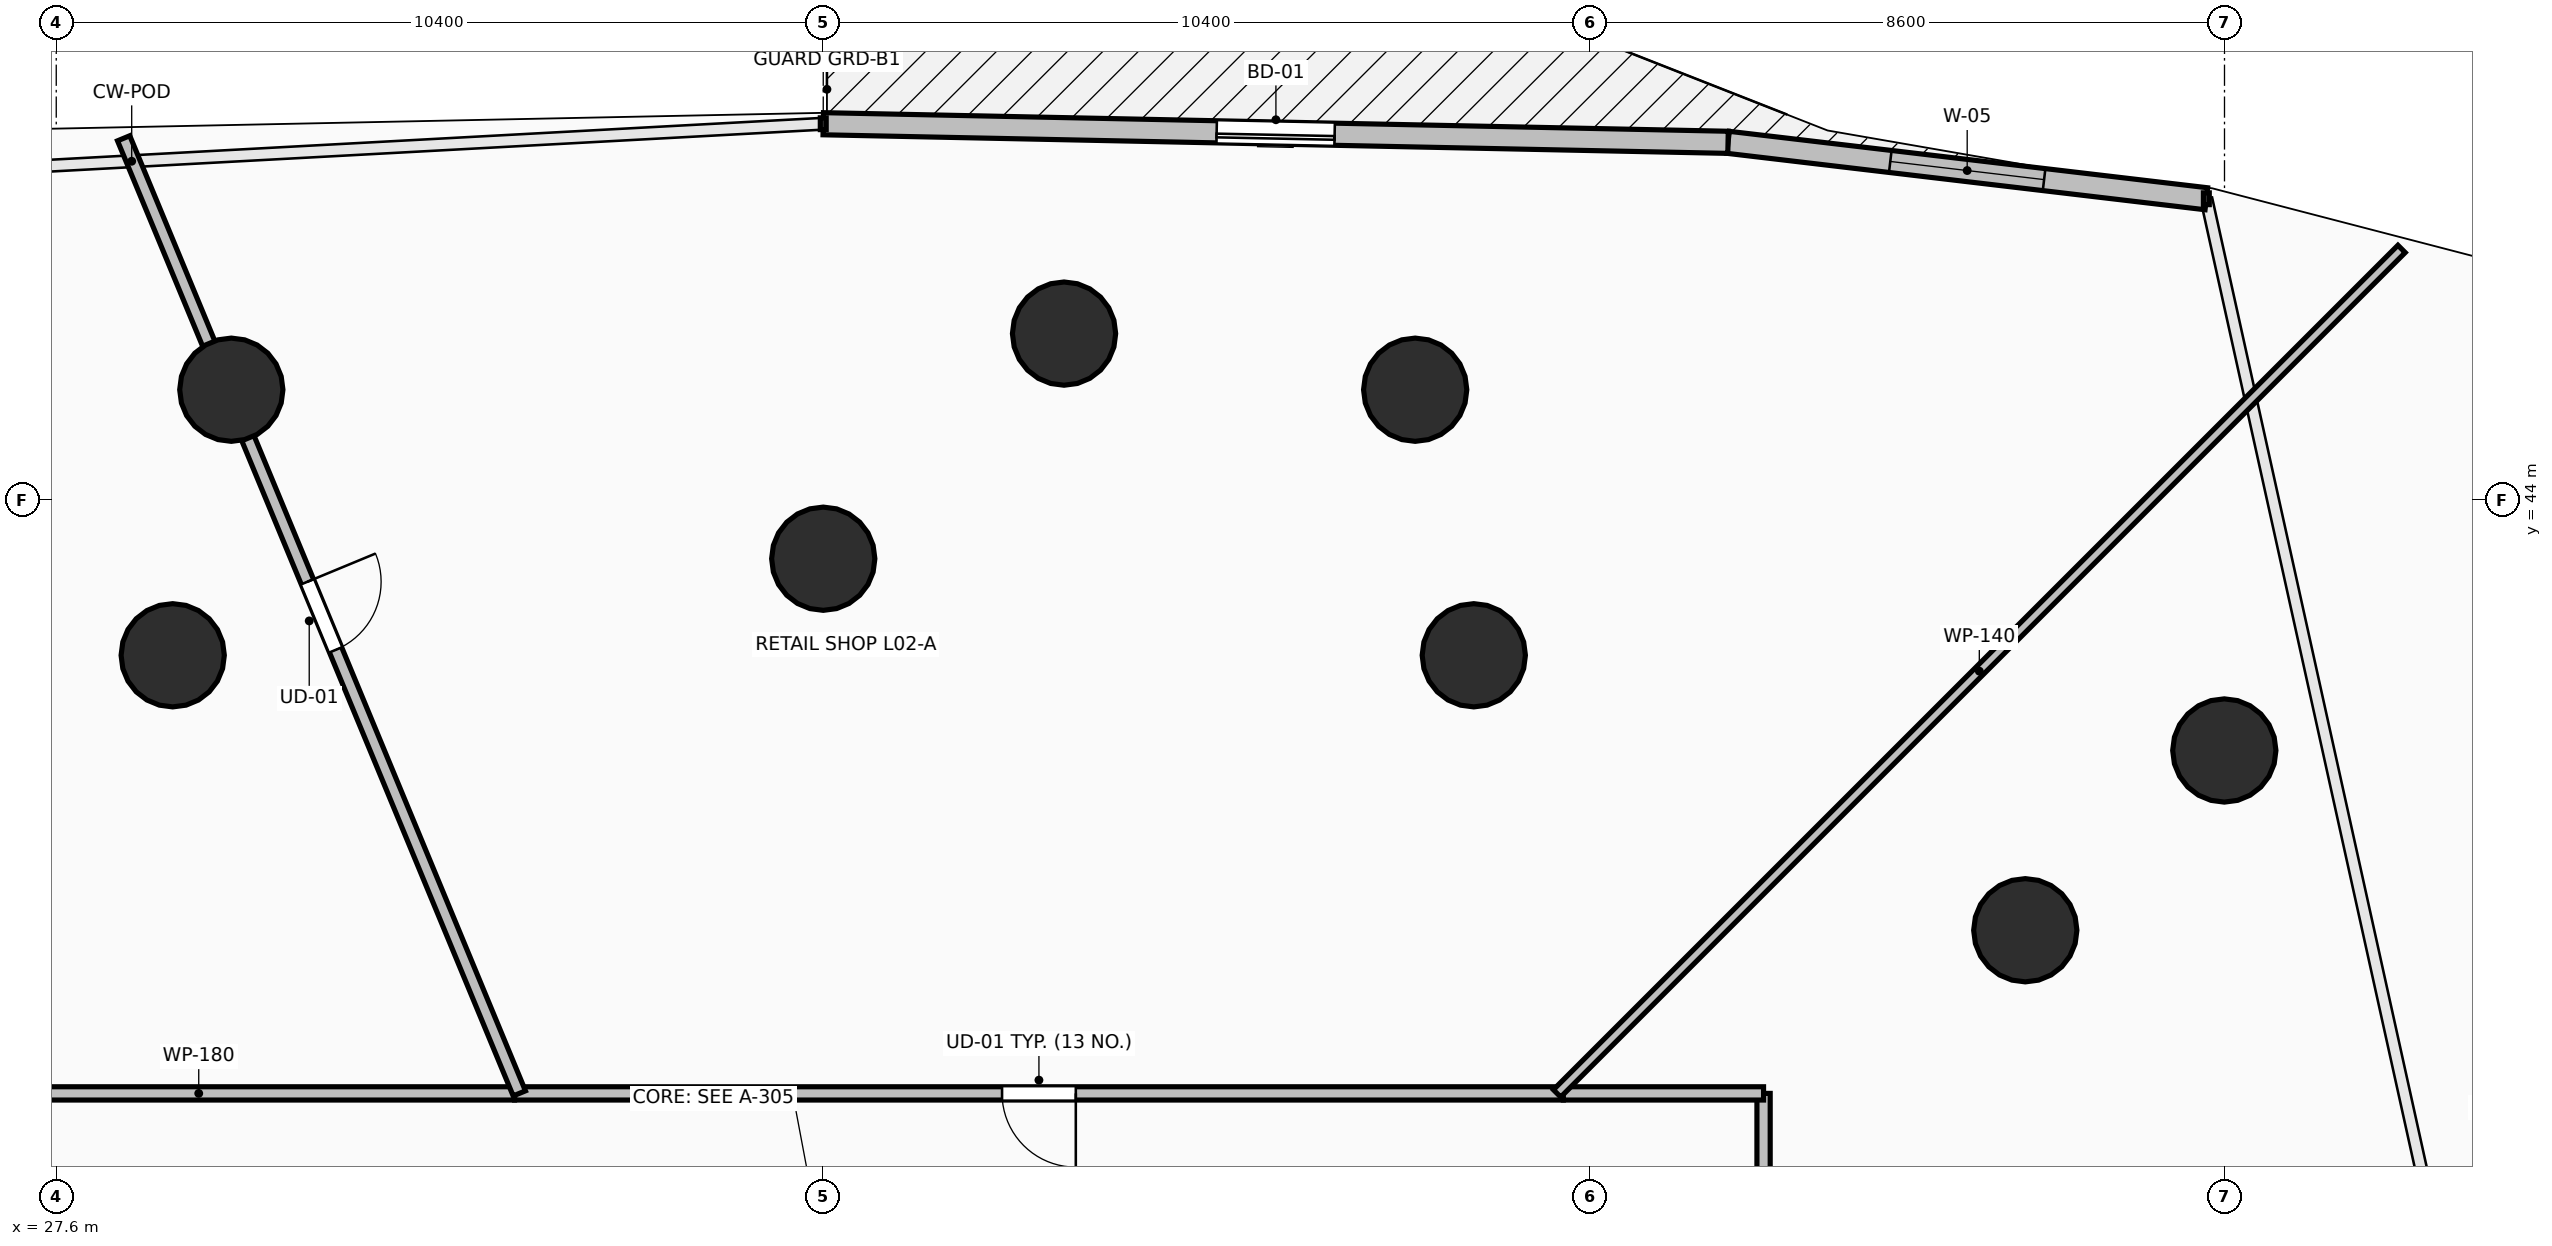
"""IFC4 building model, lengths in metres.
Left out: names, types, materials, properties, quantities, classifications, styles, units other than length and angle.
Written with IfcOpenShell. Run it as: python <this file> out.ifc"""

import sys

from ifc_helpers import new_model, si_unit, direction, frame, frame_2d, origin, origin_2d, place, context, subcontext, project, spatial, rectangle, circle, extrude, element, fill, save


model = new_model("IFC4")
c1 = context("Model", 3, precision=1e-05, world=origin(), true_north=direction((0.0, 1.0)))
c2 = subcontext(c1, "Body", "Model", "MODEL_VIEW")
j1 = project(units=[si_unit("LENGTHUNIT", "METRE"), si_unit("PLANEANGLEUNIT", "RADIAN")], contexts=[c1])
p1 = place(None, origin())
s1 = spatial("IfcSite", under=j1, at=p1, CompositionType="ELEMENT")
p2 = place(p1, origin())
s2 = spatial("IfcBuilding", under=s1, at=p2, CompositionType="ELEMENT")
p3 = place(p2, frame((0.0, 0.0, 9.6)))
s3 = spatial("IfcBuildingStorey", under=s2, at=p3, CompositionType="ELEMENT", Elevation=9.6)
for number, where, z_axis, x_axis in (
    (1, (54.299, 38.162, 0.0), (0.0, 0.0, 1.0), (0.707, 0.707, 0.0)),
    (2, (46.821, 41.891, 0.0), (0.0, 0.0, 1.0), (0.383, 0.924, 0.0)),
    (3, (38.0, 43.2, 0.0), (0.0, 0.0, 1.0), (0.0, 1.0, 0.0)),
    (4, (29.179, 41.891, 0.0), (0.0, 0.0, 1.0), (-0.383, 0.924, 0.0)),
    (5, (56.997, 40.6, 0.0), (0.0, 0.0, 1.0), (0.707, 0.707, 0.0)),
    (6, (46.026, 45.492, 0.0), (0.0, 0.0, 1.0), (0.383, 0.924, 0.0)),
    (7, (41.265, 46.252, 0.0), (0.0, 0.0, 1.0), (0.0, 1.0, 0.0)),
    (8, (29.974, 45.492, 0.0), (0.0, 0.0, 1.0), (-0.383, 0.924, 0.0)),
):
    element("IfcColumn", number, at=place(p3, frame(where, z_axis=z_axis, x_axis=x_axis)), inside=s3, PredefinedType="COLUMN", context=c2, shape_type="SweptSolid", body=[
        extrude(circle(Radius=0.7, at=origin_2d()), origin(), (0.0, 0.0, 1.0), 4.8),
    ])
p4 = place(p3, frame((56.754, 48.081, 0.0), z_axis=(0.0, 0.0, 1.0), x_axis=(-0.99311278541, 0.117162261226, 0.0)))
e9 = element("IfcWall", 9, at=p4, inside=s3, PredefinedType="STANDARD", context=c2, shape_type="SweptSolid", body=[
    extrude(rectangle(XDim=6.531, YDim=0.3, at=frame_2d((3.265, 0.0))), origin(), (0.0, 0.0, 1.0), 4.48),
])
p5 = place(p4, frame((2.215, 0.0, 0.85)))
e10 = element("IfcOpeningElement", 10, at=p5, cuts=e9, PredefinedType="OPENING", context=c2, shape_type="SweptSolid", body=[
    extrude(rectangle(XDim=2.1, YDim=2.8, at=frame_2d((1.05, 1.4))), frame((0.0, 0.165, 0.0), z_axis=(0.0, -1.0, 0.0), x_axis=(1.0, 0.0, 0.0)), (0.0, 0.0, 1.0), 0.33),
])
p6 = place(p3, frame((50.268, 48.846, 0.0), z_axis=(0.0, 0.0, 1.0), x_axis=(-0.99978877583, 0.020552462746, 0.0)))
e11 = element("IfcWall", 11, at=p6, inside=s3, PredefinedType="STANDARD", context=c2, shape_type="SweptSolid", body=[
    extrude(rectangle(XDim=12.271, YDim=0.3, at=frame_2d((6.135, 0.0))), origin(), (0.0, 0.0, 1.0), 4.48),
])
p7 = place(p6, frame((5.335, 0.0, 0.0)))
e12 = element("IfcOpeningElement", 12, at=p7, cuts=e11, PredefinedType="OPENING", context=c2, shape_type="SweptSolid", body=[
    extrude(rectangle(XDim=1.6, YDim=2.3, at=frame_2d((0.8, 1.15))), frame((0.0, 0.165, 0.0), z_axis=(0.0, -1.0, 0.0), x_axis=(1.0, 0.0, 0.0)), (0.0, 0.0, 1.0), 0.33),
])
p8 = place(p3, frame((48.035, 35.95, 0.0), z_axis=(0.0, 0.0, 1.0), x_axis=(-1.0, 0.0, 0.0)))
e13 = element("IfcWall", 13, at=p8, inside=s3, PredefinedType="PARTITIONING", context=c2, shape_type="SweptSolid", body=[
    extrude(rectangle(XDim=14.221, YDim=0.18, at=frame_2d((7.11, 0.0))), origin(), (0.0, 0.0, 1.0), 3.672),
])
p9 = place(p8, frame((6.611, 0.0, 0.0)))
e14 = element("IfcOpeningElement", 14, at=p9, cuts=e13, PredefinedType="OPENING", context=c2, shape_type="SweptSolid", body=[
    extrude(rectangle(XDim=1.0, YDim=2.15, at=frame_2d((0.5, 1.075))), frame((0.0, 0.105, 0.0), z_axis=(0.0, -1.0, 0.0), x_axis=(1.0, 0.0, 0.0)), (0.0, 0.0, 1.0), 0.21),
])
p10 = place(p3, frame((33.814, 35.95, 0.0), z_axis=(0.0, 0.0, 1.0), x_axis=(-1.0, 0.0, 0.0)))
e15 = element("IfcWall", 15, at=p10, inside=s3, PredefinedType="PARTITIONING", context=c2, shape_type="SweptSolid", body=[
    extrude(rectangle(XDim=8.564, YDim=0.18, at=frame_2d((4.282, 0.0))), origin(), (0.0, 0.0, 1.0), 3.672),
])
p11 = place(p3, frame((50.75, 26.2, 0.0), z_axis=(0.0, 0.0, 1.0), x_axis=(0.0, 1.0, 0.0)))
e16 = element("IfcWall", 16, at=p11, inside=s3, PredefinedType="PARTITIONING", context=c2, shape_type="SweptSolid", body=[
    extrude(rectangle(XDim=9.75, YDim=0.18, at=frame_2d((4.875, 0.0))), origin(), (0.0, 0.0, 1.0), 3.672),
])
p12 = place(p11, frame((4.375, 0.0, 0.0)))
e17 = element("IfcOpeningElement", 17, at=p12, cuts=e16, PredefinedType="OPENING", context=c2, shape_type="SweptSolid", body=[
    extrude(rectangle(XDim=1.0, YDim=2.15, at=frame_2d((0.5, 1.075))), frame((0.0, 0.105, 0.0), z_axis=(0.0, -1.0, 0.0), x_axis=(1.0, 0.0, 0.0)), (0.0, 0.0, 1.0), 0.21),
])
p13 = place(p3, frame((50.75, 35.95, 0.0), z_axis=(0.0, 0.0, 1.0), x_axis=(-1.0, 0.0, 0.0)))
e18 = element("IfcWall", 18, at=p13, inside=s3, PredefinedType="PARTITIONING", context=c2, shape_type="SweptSolid", body=[
    extrude(rectangle(XDim=2.715, YDim=0.18, at=frame_2d((1.357, 0.0))), origin(), (0.0, 0.0, 1.0), 3.672),
])
p14 = place(p3, frame((28.514, 48.901, 0.0), z_axis=(0.0, 0.0, 1.0), x_axis=(0.38271633175, -0.923865904453, 0.0)))
e19 = element("IfcWall", 19, at=p14, inside=s3, PredefinedType="PARTITIONING", context=c2, shape_type="SweptSolid", body=[
    extrude(rectangle(XDim=14.018, YDim=0.18, at=frame_2d((7.009, 0.0))), origin(), (0.0, 0.0, 1.0), 3.672),
])
p15 = place(p14, frame((6.509, 0.0, 0.0)))
e20 = element("IfcOpeningElement", 20, at=p15, cuts=e19, PredefinedType="OPENING", context=c2, shape_type="SweptSolid", body=[
    extrude(rectangle(XDim=1.0, YDim=2.15, at=frame_2d((0.5, 1.075))), frame((0.0, 0.105, 0.0), z_axis=(0.0, -1.0, 0.0), x_axis=(1.0, 0.0, 0.0)), (0.0, 0.0, 1.0), 0.21),
])
p16 = place(p3, frame((47.95, 35.95, 0.0), z_axis=(0.0, 0.0, 1.0), x_axis=(0.707106781187, 0.707106781187, 0.0)))
e21 = element("IfcWall", 21, at=p16, inside=s3, PredefinedType="PARTITIONING", context=c2, shape_type="SweptSolid", body=[
    extrude(rectangle(XDim=16.194, YDim=0.14, at=frame_2d((8.097, 0.0))), origin(), (0.0, 0.0, 1.0), 3.672),
])
p17 = place(p7, origin())
e22 = element("IfcDoor", 22, at=p17, inside=s3, OperationType="SLIDING_TO_LEFT", PredefinedType="DOOR", context=c2, shape_type="SweptSolid", body=[
    extrude(rectangle(XDim=1.6, YDim=2.3, at=frame_2d((0.8, 1.15))), frame((0.0, 0.025, 0.0), z_axis=(0.0, -1.0, 0.0), x_axis=(1.0, 0.0, 0.0)), (0.0, 0.0, 1.0), 0.05),
])
fill(e12, e22)
p18 = place(p5, origin())
e23 = element("IfcWindow", 23, at=p18, inside=s3, PartitioningType="SINGLE_PANEL", PredefinedType="WINDOW", context=c2, shape_type="SweptSolid", body=[
    extrude(rectangle(XDim=2.1, YDim=2.8, at=frame_2d((1.05, 1.4))), frame((0.0, 0.03, 0.0), z_axis=(0.0, -1.0, 0.0), x_axis=(1.0, 0.0, 0.0)), (0.0, 0.0, 1.0), 0.06),
])
fill(e10, e23)
p19 = place(p9, origin())
e24 = element("IfcDoor", 24, at=p19, inside=s3, OperationType="SINGLE_SWING_LEFT", PredefinedType="DOOR", context=c2, shape_type="SweptSolid", body=[
    extrude(rectangle(XDim=1.0, YDim=2.15, at=frame_2d((0.5, 1.075))), frame((0.0, 0.025, 0.0), z_axis=(0.0, -1.0, 0.0), x_axis=(1.0, 0.0, 0.0)), (0.0, 0.0, 1.0), 0.05),
])
fill(e14, e24)
p20 = place(p15, origin())
e25 = element("IfcDoor", 25, at=p20, inside=s3, OperationType="SINGLE_SWING_LEFT", PredefinedType="DOOR", context=c2, shape_type="SweptSolid", body=[
    extrude(rectangle(XDim=1.0, YDim=2.15, at=frame_2d((0.5, 1.075))), frame((0.0, 0.025, 0.0), z_axis=(0.0, -1.0, 0.0), x_axis=(1.0, 0.0, 0.0)), (0.0, 0.0, 1.0), 0.05),
])
fill(e20, e25)
save(model, sys.argv[1])
